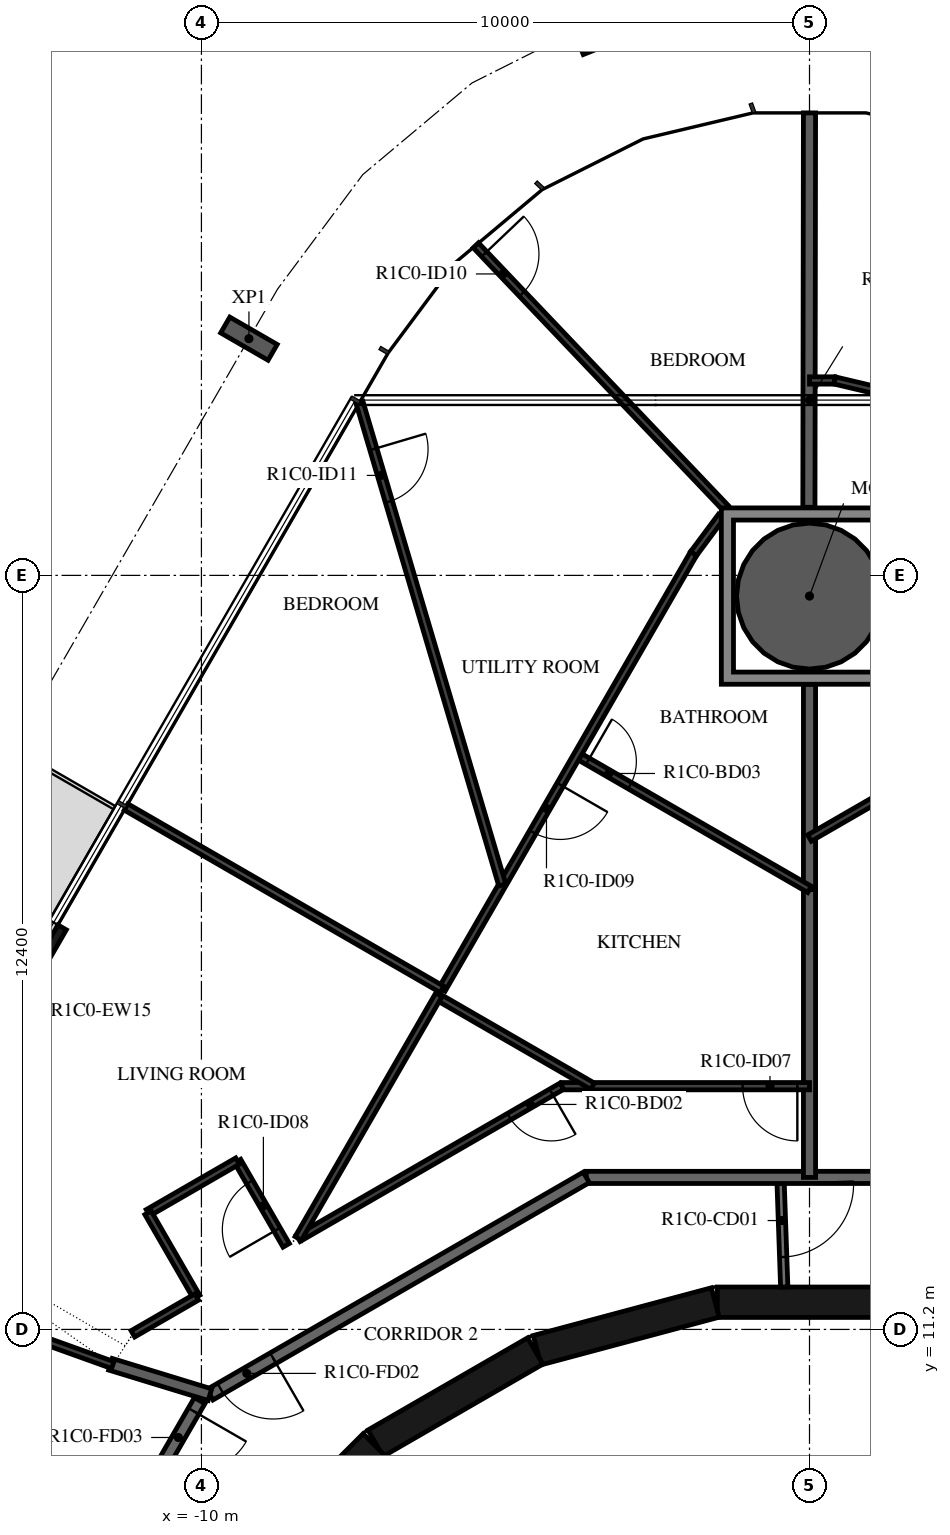
"""IFC4 building model, lengths in metres.
Left out: names, types, materials, properties, quantities, classifications, styles, units other than length and angle.
Written with IfcOpenShell. Run it as: python <this file> out.ifc"""

import sys

from ifc_helpers import new_model, si_unit, direction, frame, frame_2d, origin, origin_2d, place, context, subcontext, project, spatial, polyline, rectangle, hollow_circle, i_section, outline, extrude, element, fill, save


model = new_model("IFC4")
c1 = context("Model", 3, precision=1e-05, world=origin(), true_north=direction((0.0, 1.0)))
c2 = subcontext(c1, "Body", "Model", "MODEL_VIEW")
j1 = project(units=[si_unit("LENGTHUNIT", "METRE"), si_unit("PLANEANGLEUNIT", "RADIAN")], contexts=[c1])
p1 = place(None, origin())
s1 = spatial("IfcSite", under=j1, at=p1, CompositionType="ELEMENT")
p2 = place(p1, origin())
s2 = spatial("IfcBuilding", under=s1, at=p2, CompositionType="ELEMENT")
p3 = place(p2, frame((0.0, 0.0, 59.4)))
s3 = spatial("IfcBuildingStorey", under=s2, at=p3, CompositionType="ELEMENT", Elevation=59.4)
p4 = place(p3, frame((0.0, 23.26, -0.38), z_axis=(0.0, 0.0, 1.0), x_axis=(1.0, 0.0, 0.0)))
e1 = element("IfcColumn", 1, at=p4, inside=s3, PredefinedType="COLUMN", context=c2, shape_type="SweptSolid", body=[
    extrude(hollow_circle(Radius=1.2, WallThickness=0.06, at=origin_2d()), origin(), (0.0, 0.0, 1.0), 3.5),
])
for number, where, z_axis, x_axis in (
    (2, (-3.748, 32.639, -0.38), (0.0, 0.0, 1.0), (0.929, 0.371, 0.0)),
    (3, (-9.219, 27.493, -0.38), (0.0, 0.0, 1.0), (0.5, 0.866, 0.0)),
):
    element("IfcColumn", number, at=place(p3, frame(where, z_axis=z_axis, x_axis=x_axis)), inside=s3, PredefinedType="COLUMN", context=c2, shape_type="SweptSolid", body=[
        extrude(i_section(OverallWidth=0.3, OverallDepth=0.9, WebThickness=0.019, FlangeThickness=0.035, FilletRadius=0.03, at=origin_2d()), origin(), (0.0, 0.0, 1.0), 3.5),
    ])
p5 = place(p3, frame((-12.291, 17.812, 0.0), z_axis=(0.0, 0.0, 1.0), x_axis=(-0.499971222258, -0.866042017984, 0.0)))
e4 = element("IfcWall", 4, at=p5, inside=s3, PredefinedType="STANDARD", context=c2, shape_type="SweptSolid", body=[
    extrude(rectangle(XDim=3.2, YDim=0.16, at=frame_2d((1.6, 0.0))), origin(), (0.0, 0.0, 1.0), 3.12),
])
p6 = place(p5, frame((0.4, 0.0, 0.0)))
e5 = element("IfcOpeningElement", 5, at=p6, cuts=e4, PredefinedType="OPENING", context=c2, shape_type="SweptSolid", body=[
    extrude(rectangle(XDim=2.4, YDim=2.4, at=frame_2d((1.2, 1.2))), frame((0.0, 0.09, 0.0), z_axis=(0.0, -1.0, 0.0), x_axis=(1.0, 0.0, 0.0)), (0.0, 0.0, 1.0), 0.18),
])
for number, where, z_axis, x_axis in (
    (6, (1.516, 11.647, 0.0), (0.0, 0.0, 1.0), (-1.0, 0.0, 0.0)),
    (7, (-1.55, 11.643, 0.0), (0.0, 0.0, 1.0), (-0.966, -0.259, 0.0)),
    (8, (-4.51, 10.845, 0.0), (0.0, 0.0, 1.0), (-0.866, -0.5, 0.0)),
):
    element("IfcWall", number, at=place(p3, frame(where, z_axis=z_axis, x_axis=x_axis)), inside=s3, PredefinedType="SHEAR", context=c2, shape_type="SweptSolid", body=[
        extrude(rectangle(XDim=3.033, YDim=0.5, at=frame_2d((1.516, 0.0))), origin(), (0.0, 0.0, 1.0), 3.12),
    ])
p7 = place(p3, frame((-7.164, 9.308, 0.0), z_axis=(0.0, 0.0, 1.0), x_axis=(-0.707106781187, -0.707106781187, 0.0)))
e9 = element("IfcWall", 9, at=p7, inside=s3, PredefinedType="SHEAR", context=c2, shape_type="SweptSolid", body=[
    extrude(rectangle(XDim=3.032, YDim=0.5, at=frame_2d((1.516, 0.0))), origin(), (0.0, 0.0, 1.0), 3.12),
])
p8 = place(p7, frame((1.416, 0.0, 0.0)))
e10 = element("IfcOpeningElement", 10, at=p8, cuts=e9, PredefinedType="OPENING", context=c2, shape_type="SweptSolid", body=[
    extrude(rectangle(XDim=1.2, YDim=2.1, at=frame_2d((0.6, 1.05))), frame((0.0, 0.26, 0.0), z_axis=(0.0, -1.0, 0.0), x_axis=(1.0, 0.0, 0.0)), (0.0, 0.0, 1.0), 0.52),
])
p9 = place(p3, frame((-0.479, 13.7, 0.0), z_axis=(0.0, 0.0, 1.0), x_axis=(0.034919103017, -0.999390142159, 0.0)))
e11 = element("IfcWall", 11, at=p9, inside=s3, PredefinedType="PARTITIONING", context=c2, shape_type="SweptSolid", body=[
    extrude(rectangle(XDim=1.804, YDim=0.12, at=frame_2d((0.902, 0.0))), origin(), (0.0, 0.0, 1.0), 3.12),
])
p10 = place(p9, frame((0.11, 0.0, 0.0)))
e12 = element("IfcOpeningElement", 12, at=p10, cuts=e11, PredefinedType="OPENING", context=c2, shape_type="SweptSolid", body=[
    extrude(rectangle(XDim=1.2, YDim=2.1, at=frame_2d((0.6, 1.05))), frame((0.0, 0.07, 0.0), z_axis=(0.0, -1.0, 0.0), x_axis=(1.0, 0.0, 0.0)), (0.0, 0.0, 1.0), 0.14),
])
p11 = place(p3, frame((3.671, 13.7, 0.0), z_axis=(0.0, 0.0, 1.0), x_axis=(-1.0, 0.0, 0.0)))
e13 = element("IfcWall", 13, at=p11, inside=s3, PredefinedType="STANDARD", context=c2, shape_type="SweptSolid", body=[
    extrude(rectangle(XDim=7.342, YDim=0.2, at=frame_2d((3.671, 0.0))), origin(), (0.0, 0.0, 1.0), 3.12),
])
p12 = place(p3, frame((-3.671, 13.7, 0.0), z_axis=(0.0, 0.0, 1.0), x_axis=(-0.866031419417, -0.499989580474, 0.0)))
e14 = element("IfcWall", 14, at=p12, inside=s3, PredefinedType="STANDARD", context=c2, shape_type="SweptSolid", body=[
    extrude(rectangle(XDim=7.147, YDim=0.2, at=frame_2d((3.573, 0.0))), origin(), (0.0, 0.0, 1.0), 3.12),
])
p13 = place(p12, frame((5.947, 0.0, 0.0)))
e15 = element("IfcOpeningElement", 15, at=p13, cuts=e14, PredefinedType="OPENING", context=c2, shape_type="SweptSolid", body=[
    extrude(rectangle(XDim=1.0, YDim=2.1, at=frame_2d((0.5, 1.05))), frame((0.0, 0.11, 0.0), z_axis=(0.0, -1.0, 0.0), x_axis=(1.0, 0.0, 0.0)), (0.0, 0.0, 1.0), 0.22),
])
p14 = place(p3, frame((-10.029, 10.029, 0.0), z_axis=(0.0, 0.0, 1.0), x_axis=(-0.500001669485, -0.866024439905, 0.0)))
e16 = element("IfcWall", 16, at=p14, inside=s3, PredefinedType="STANDARD", context=c2, shape_type="SweptSolid", body=[
    extrude(rectangle(XDim=7.342, YDim=0.2, at=frame_2d((3.671, 0.0))), origin(), (0.0, 0.0, 1.0), 3.12),
])
p15 = place(p14, frame((0.2, 0.0, 0.0)))
e17 = element("IfcOpeningElement", 17, at=p15, cuts=e16, PredefinedType="OPENING", context=c2, shape_type="SweptSolid", body=[
    extrude(rectangle(XDim=1.0, YDim=2.1, at=frame_2d((0.5, 1.05))), frame((0.0, 0.11, 0.0), z_axis=(0.0, -1.0, 0.0), x_axis=(1.0, 0.0, 0.0)), (0.0, 0.0, 1.0), 0.22),
])
p16 = place(p3, frame((0.0, 18.437, 0.0), z_axis=(0.0, 0.0, 1.0), x_axis=(0.0, -1.0, 0.0)))
e18 = element("IfcWall", 18, at=p16, inside=s3, PredefinedType="STANDARD", context=c2, shape_type="SweptSolid", body=[
    extrude(rectangle(XDim=4.737, YDim=0.2, at=frame_2d((2.368, 0.0))), origin(), (0.0, 0.0, 1.0), 3.12),
])
p17 = place(p3, frame((0.0, 21.81, 0.0), z_axis=(0.0, 0.0, 1.0), x_axis=(0.0, -1.0, 0.0)))
e19 = element("IfcWall", 19, at=p17, inside=s3, PredefinedType="STANDARD", context=c2, shape_type="SweptSolid", body=[
    extrude(rectangle(XDim=3.373, YDim=0.2, at=frame_2d((1.687, 0.0))), origin(), (0.0, 0.0, 1.0), 3.12),
])
p18 = place(p3, frame((0.0, 31.206, 0.0), z_axis=(0.0, 0.0, 1.0), x_axis=(-0.001543266126, -0.999998809164, 0.0)))
e20 = element("IfcWall", 20, at=p18, inside=s3, PredefinedType="STANDARD", context=c2, shape_type="SweptSolid", body=[
    extrude(rectangle(XDim=6.486, YDim=0.2, at=frame_2d((3.243, 0.0))), origin(), (0.0, 0.0, 1.0), 3.12),
])
p19 = place(p3, frame((-11.496, 10.627, 0.0), z_axis=(0.0, 0.0, 1.0), x_axis=(0.956240708563, -0.292581112321, 0.0)))
e21 = element("IfcWall", 21, at=p19, inside=s3, PredefinedType="STANDARD", context=c2, shape_type="SweptSolid", body=[
    extrude(rectangle(XDim=1.711, YDim=0.2, at=frame_2d((0.855, 0.0))), origin(), (0.0, 0.0, 1.0), 3.12),
])
p20 = place(p3, frame((4.841, 22.075, 0.0), z_axis=(0.0, 0.0, 1.0), x_axis=(-0.866019751484, -0.500009789943, 0.0)))
e22 = element("IfcWall", 22, at=p20, inside=s3, PredefinedType="PARTITIONING", context=c2, shape_type="SweptSolid", body=[
    extrude(rectangle(XDim=5.59, YDim=0.12, at=frame_2d((2.795, 0.0))), origin(), (0.0, 0.0, 1.0), 3.12),
])
p21 = place(p20, frame((0.2, 0.0, 0.0)))
e23 = element("IfcOpeningElement", 23, at=p21, cuts=e22, PredefinedType="OPENING", context=c2, shape_type="SweptSolid", body=[
    extrude(rectangle(XDim=0.9, YDim=2.1, at=frame_2d((0.45, 1.05))), frame((0.0, 0.07, 0.0), z_axis=(0.0, -1.0, 0.0), x_axis=(1.0, 0.0, 0.0)), (0.0, 0.0, 1.0), 0.14),
])
p22 = place(p3, frame((0.0, 26.806, 0.0), z_axis=(0.0, 0.0, 1.0), x_axis=(1.0, 0.0, 0.0)))
e24 = element("IfcWall", 24, at=p22, inside=s3, PredefinedType="PARTITIONING", context=c2, shape_type="SweptSolid", body=[
    extrude(rectangle(XDim=0.415, YDim=0.12, at=frame_2d((0.207, 0.0))), origin(), (0.0, 0.0, 1.0), 3.12),
])
p23 = place(p3, frame((0.415, 26.806, 0.0), z_axis=(0.0, 0.0, 1.0), x_axis=(0.973048993259, -0.230598475097, 0.0)))
e25 = element("IfcWall", 25, at=p23, inside=s3, PredefinedType="PARTITIONING", context=c2, shape_type="SweptSolid", body=[
    extrude(rectangle(XDim=0.829, YDim=0.12, at=frame_2d((0.415, 0.0))), origin(), (0.0, 0.0, 1.0), 3.12),
])
p24 = place(p3, frame((0.0, 15.2, 0.0), z_axis=(0.0, 0.0, 1.0), x_axis=(-1.0, 0.0, 0.0)))
e26 = element("IfcWall", 26, at=p24, inside=s3, PredefinedType="PARTITIONING", context=c2, shape_type="SweptSolid", body=[
    extrude(rectangle(XDim=4.073, YDim=0.12, at=frame_2d((2.036, 0.0))), origin(), (0.0, 0.0, 1.0), 3.12),
])
p25 = place(p24, frame((0.2, 0.0, 0.0)))
e27 = element("IfcOpeningElement", 27, at=p25, cuts=e26, PredefinedType="OPENING", context=c2, shape_type="SweptSolid", body=[
    extrude(rectangle(XDim=0.9, YDim=2.1, at=frame_2d((0.45, 1.05))), frame((0.0, 0.07, 0.0), z_axis=(0.0, -1.0, 0.0), x_axis=(1.0, 0.0, 0.0)), (0.0, 0.0, 1.0), 0.14),
])
p26 = place(p3, frame((-4.073, 15.2, 0.0), z_axis=(0.0, 0.0, 1.0), x_axis=(-0.866034514313, -0.499984219769, 0.0)))
e28 = element("IfcWall", 28, at=p26, inside=s3, PredefinedType="PARTITIONING", context=c2, shape_type="SweptSolid", body=[
    extrude(rectangle(XDim=5.006, YDim=0.12, at=frame_2d((2.503, 0.0))), origin(), (0.0, 0.0, 1.0), 3.12),
])
p27 = place(p26, frame((0.2, 0.0, 0.0)))
e29 = element("IfcOpeningElement", 29, at=p27, cuts=e28, PredefinedType="OPENING", context=c2, shape_type="SweptSolid", body=[
    extrude(rectangle(XDim=0.8, YDim=2.1, at=frame_2d((0.4, 1.05))), frame((0.0, 0.07, 0.0), z_axis=(0.0, -1.0, 0.0), x_axis=(1.0, 0.0, 0.0)), (0.0, 0.0, 1.0), 0.14),
])
p28 = place(p3, frame((-8.606, 12.583, 0.0), z_axis=(0.0, 0.0, 1.0), x_axis=(-0.499995408039, 0.866028054938, 0.0)))
e30 = element("IfcWall", 30, at=p28, inside=s3, PredefinedType="PARTITIONING", context=c2, shape_type="SweptSolid", body=[
    extrude(rectangle(XDim=1.6, YDim=0.12, at=frame_2d((0.8, 0.0))), origin(), (0.0, 0.0, 1.0), 3.12),
])
p29 = place(p28, frame((0.3, 0.0, 0.0)))
e31 = element("IfcOpeningElement", 31, at=p29, cuts=e30, PredefinedType="OPENING", context=c2, shape_type="SweptSolid", body=[
    extrude(rectangle(XDim=0.9, YDim=2.1, at=frame_2d((0.45, 1.05))), frame((0.0, 0.07, 0.0), z_axis=(0.0, -1.0, 0.0), x_axis=(1.0, 0.0, 0.0)), (0.0, 0.0, 1.0), 0.14),
])
p30 = place(p3, frame((-9.406, 13.969, 0.0), z_axis=(0.0, 0.0, 1.0), x_axis=(-0.865989465428, -0.500062241894, 0.0)))
e32 = element("IfcWall", 32, at=p30, inside=s3, PredefinedType="PARTITIONING", context=c2, shape_type="SweptSolid", body=[
    extrude(rectangle(XDim=1.7, YDim=0.12, at=frame_2d((0.85, 0.0))), origin(), (0.0, 0.0, 1.0), 3.12),
])
p31 = place(p3, frame((-10.878, 13.118, 0.0), z_axis=(0.0, 0.0, 1.0), x_axis=(0.500061482766, -0.865989903783, 0.0)))
e33 = element("IfcWall", 33, at=p31, inside=s3, PredefinedType="PARTITIONING", context=c2, shape_type="SweptSolid", body=[
    extrude(rectangle(XDim=1.6, YDim=0.12, at=frame_2d((0.8, 0.0))), origin(), (0.0, 0.0, 1.0), 3.12),
])
p32 = place(p3, frame((-10.078, 11.733, 0.0), z_axis=(0.0, 0.0, 1.0), x_axis=(-0.866014416983, -0.500019029215, 0.0)))
e34 = element("IfcWall", 34, at=p32, inside=s3, PredefinedType="PARTITIONING", context=c2, shape_type="SweptSolid", body=[
    extrude(rectangle(XDim=1.211, YDim=0.12, at=frame_2d((0.606, 0.0))), origin(), (0.0, 0.0, 1.0), 3.12),
])
p33 = place(p3, frame((-5.487, 29.028, 0.0), z_axis=(0.0, 0.0, 1.0), x_axis=(0.689189638576, -0.724581011398, 0.0)))
e35 = element("IfcWall", 35, at=p33, inside=s3, PredefinedType="PARTITIONING", context=c2, shape_type="SweptSolid", body=[
    extrude(rectangle(XDim=5.96, YDim=0.12, at=frame_2d((2.98, 0.0))), origin(), (0.0, 0.0, 1.0), 3.12),
])
p34 = place(p33, frame((0.2, 0.0, 0.0)))
e36 = element("IfcOpeningElement", 36, at=p34, cuts=e35, PredefinedType="OPENING", context=c2, shape_type="SweptSolid", body=[
    extrude(rectangle(XDim=0.9, YDim=2.1, at=frame_2d((0.45, 1.05))), frame((0.0, 0.07, 0.0), z_axis=(0.0, -1.0, 0.0), x_axis=(1.0, 0.0, 0.0)), (0.0, 0.0, 1.0), 0.14),
])
p35 = place(p3, frame((-3.821, 20.643, 0.0), z_axis=(0.0, 0.0, 1.0), x_axis=(0.866024310165, -0.5000018942, 0.0)))
e37 = element("IfcWall", 37, at=p35, inside=s3, PredefinedType="PARTITIONING", context=c2, shape_type="SweptSolid", body=[
    extrude(rectangle(XDim=4.412, YDim=0.12, at=frame_2d((2.206, 0.0))), origin(), (0.0, 0.0, 1.0), 3.12),
])
p36 = place(p35, frame((0.2, 0.0, 0.0)))
e38 = element("IfcOpeningElement", 38, at=p36, cuts=e37, PredefinedType="OPENING", context=c2, shape_type="SweptSolid", body=[
    extrude(rectangle(XDim=0.8, YDim=2.1, at=frame_2d((0.4, 1.05))), frame((0.0, 0.07, 0.0), z_axis=(0.0, -1.0, 0.0), x_axis=(1.0, 0.0, 0.0)), (0.0, 0.0, 1.0), 0.14),
])
p37 = place(p3, frame((-1.45, 24.571, 0.0), z_axis=(0.0, 0.0, 1.0), x_axis=(-0.597187509737, -0.802101663266, 0.0)))
e39 = element("IfcWall", 39, at=p37, inside=s3, PredefinedType="PARTITIONING", context=c2, shape_type="SweptSolid", body=[
    extrude(rectangle(XDim=0.765, YDim=0.12, at=frame_2d((0.382, 0.0))), origin(), (0.0, 0.0, 1.0), 3.12),
])
p38 = place(p3, frame((-1.907, 23.957, 0.0), z_axis=(0.0, 0.0, 1.0), x_axis=(-0.499994901178, -0.866028347571, 0.0)))
e40 = element("IfcWall", 40, at=p38, inside=s3, PredefinedType="PARTITIONING", context=c2, shape_type="SweptSolid", body=[
    extrude(rectangle(XDim=8.274, YDim=0.12, at=frame_2d((4.137, 0.0))), origin(), (0.0, 0.0, 1.0), 3.12),
])
p39 = place(p38, frame((4.387, 0.0, 0.0)))
e41 = element("IfcOpeningElement", 41, at=p39, cuts=e40, PredefinedType="OPENING", context=c2, shape_type="SweptSolid", body=[
    extrude(rectangle(XDim=0.9, YDim=2.1, at=frame_2d((0.45, 1.05))), frame((0.0, 0.07, 0.0), z_axis=(0.0, -1.0, 0.0), x_axis=(1.0, 0.0, 0.0)), (0.0, 0.0, 1.0), 0.14),
])
p40 = place(p3, frame((-6.114, 16.67, 0.0), z_axis=(0.0, 0.0, 1.0), x_axis=(0.866011328839, -0.500024377727, 0.0)))
e42 = element("IfcWall", 42, at=p40, inside=s3, PredefinedType="PARTITIONING", context=c2, shape_type="SweptSolid", body=[
    extrude(rectangle(XDim=2.94, YDim=0.12, at=frame_2d((1.47, 0.0))), origin(), (0.0, 0.0, 1.0), 3.12),
])
p41 = place(p3, frame((-7.4, 26.443, 0.0), z_axis=(0.0, 0.0, 1.0), x_axis=(0.283777867447, -0.95889004685, 0.0)))
e43 = element("IfcWall", 43, at=p41, inside=s3, PredefinedType="PARTITIONING", context=c2, shape_type="SweptSolid", body=[
    extrude(rectangle(XDim=8.274, YDim=0.12, at=frame_2d((4.137, 0.0))), origin(), (0.0, 0.0, 1.0), 3.12),
])
p42 = place(p41, frame((0.8, 0.0, 0.0)))
e44 = element("IfcOpeningElement", 44, at=p42, cuts=e43, PredefinedType="OPENING", context=c2, shape_type="SweptSolid", body=[
    extrude(rectangle(XDim=0.9, YDim=2.1, at=frame_2d((0.45, 1.05))), frame((0.0, 0.07, 0.0), z_axis=(0.0, -1.0, 0.0), x_axis=(1.0, 0.0, 0.0)), (0.0, 0.0, 1.0), 0.14),
])
p43 = place(p3, frame((-11.24, 19.792, 0.0), z_axis=(0.0, 0.0, 1.0), x_axis=(0.866031096941, -0.499990139034, 0.0)))
e45 = element("IfcWall", 45, at=p43, inside=s3, PredefinedType="PARTITIONING", context=c2, shape_type="SweptSolid", body=[
    extrude(rectangle(XDim=6.0, YDim=0.12, at=frame_2d((3.0, 0.0))), origin(), (0.0, 0.0, 1.0), 2.73),
])
p44 = place(p3, frame((-6.094, 16.705, 0.0), z_axis=(0.0, 0.0, 1.0), x_axis=(-0.500014747178, -0.86601688933, 0.0)))
e46 = element("IfcWall", 46, at=p44, inside=s3, PredefinedType="PARTITIONING", context=c2, shape_type="SweptSolid", body=[
    extrude(rectangle(XDim=4.627, YDim=0.12, at=frame_2d((2.313, 0.0))), origin(), (0.0, 0.0, 1.0), 3.12),
])
p45 = place(p3, frame((-11.458, 10.614, 0.0), z_axis=(0.0, 0.0, 1.0), x_axis=(-0.941092440198, 0.338149403375, 0.0)))
e47 = element("IfcWall", 47, at=p45, inside=s3, PredefinedType="PARTITIONING", context=c2, shape_type="SweptSolid", body=[
    extrude(rectangle(XDim=2.123, YDim=0.12, at=frame_2d((1.062, 0.0))), origin(), (0.0, 0.0, 1.0), 3.12),
])
p46 = place(p3, origin())
e48 = element("IfcWall", 48, at=p46, inside=s3, PredefinedType="STANDARD", context=c2, shape_type="SweptSolid", body=[
    extrude(outline(polyline([(1.45, 24.71), (1.45, 21.81), (-1.45, 21.81), (-1.45, 24.71), (1.45, 24.71)]), holes=[polyline([(-1.25, 22.01), (1.25, 22.01), (1.25, 24.51), (-1.25, 24.51), (-1.25, 22.01)])]), origin(), (0.0, 0.0, 1.0), 3.12),
])
p47 = place(p13, origin())
e49 = element("IfcDoor", 49, at=p47, inside=s3, OperationType="SINGLE_SWING_LEFT", PredefinedType="DOOR", context=c2, shape_type="SweptSolid", body=[
    extrude(rectangle(XDim=1.0, YDim=2.1, at=frame_2d((0.5, 1.05))), frame((0.0, 0.025, 0.0), z_axis=(0.0, -1.0, 0.0), x_axis=(1.0, 0.0, 0.0)), (0.0, 0.0, 1.0), 0.05),
])
fill(e15, e49)
p48 = place(p25, origin())
e50 = element("IfcDoor", 50, at=p48, inside=s3, OperationType="SINGLE_SWING_RIGHT", PredefinedType="DOOR", context=c2, shape_type="SweptSolid", body=[
    extrude(rectangle(XDim=0.9, YDim=2.1, at=frame_2d((0.45, 1.05))), frame((0.0, 0.025, 0.0), z_axis=(0.0, -1.0, 0.0), x_axis=(1.0, 0.0, 0.0)), (0.0, 0.0, 1.0), 0.05),
])
fill(e27, e50)
p49 = place(p27, origin())
e51 = element("IfcDoor", 51, at=p49, inside=s3, OperationType="SINGLE_SWING_LEFT", PredefinedType="DOOR", context=c2, shape_type="SweptSolid", body=[
    extrude(rectangle(XDim=0.8, YDim=2.1, at=frame_2d((0.4, 1.05))), frame((0.0, 0.025, 0.0), z_axis=(0.0, -1.0, 0.0), x_axis=(1.0, 0.0, 0.0)), (0.0, 0.0, 1.0), 0.05),
])
fill(e29, e51)
p50 = place(p29, origin())
e52 = element("IfcDoor", 52, at=p50, inside=s3, OperationType="SINGLE_SWING_RIGHT", PredefinedType="DOOR", context=c2, shape_type="SweptSolid", body=[
    extrude(rectangle(XDim=0.9, YDim=2.1, at=frame_2d((0.45, 1.05))), frame((0.0, 0.025, 0.0), z_axis=(0.0, -1.0, 0.0), x_axis=(1.0, 0.0, 0.0)), (0.0, 0.0, 1.0), 0.05),
])
fill(e31, e52)
p51 = place(p36, origin())
e53 = element("IfcDoor", 53, at=p51, inside=s3, OperationType="SINGLE_SWING_LEFT", PredefinedType="DOOR", context=c2, shape_type="SweptSolid", body=[
    extrude(rectangle(XDim=0.8, YDim=2.1, at=frame_2d((0.4, 1.05))), frame((0.0, 0.025, 0.0), z_axis=(0.0, -1.0, 0.0), x_axis=(1.0, 0.0, 0.0)), (0.0, 0.0, 1.0), 0.05),
])
fill(e38, e53)
p52 = place(p39, origin())
e54 = element("IfcDoor", 54, at=p52, inside=s3, OperationType="SINGLE_SWING_LEFT", PredefinedType="DOOR", context=c2, shape_type="SweptSolid", body=[
    extrude(rectangle(XDim=0.9, YDim=2.1, at=frame_2d((0.45, 1.05))), frame((0.0, 0.025, 0.0), z_axis=(0.0, -1.0, 0.0), x_axis=(1.0, 0.0, 0.0)), (0.0, 0.0, 1.0), 0.05),
])
fill(e41, e54)
p53 = place(p34, origin())
e55 = element("IfcDoor", 55, at=p53, inside=s3, OperationType="SINGLE_SWING_LEFT", PredefinedType="DOOR", context=c2, shape_type="SweptSolid", body=[
    extrude(rectangle(XDim=0.9, YDim=2.1, at=frame_2d((0.45, 1.05))), frame((0.0, 0.025, 0.0), z_axis=(0.0, -1.0, 0.0), x_axis=(1.0, 0.0, 0.0)), (0.0, 0.0, 1.0), 0.05),
])
fill(e36, e55)
p54 = place(p42, origin())
e56 = element("IfcDoor", 56, at=p54, inside=s3, OperationType="SINGLE_SWING_RIGHT", PredefinedType="DOOR", context=c2, shape_type="SweptSolid", body=[
    extrude(rectangle(XDim=0.9, YDim=2.1, at=frame_2d((0.45, 1.05))), frame((0.0, 0.025, 0.0), z_axis=(0.0, -1.0, 0.0), x_axis=(1.0, 0.0, 0.0)), (0.0, 0.0, 1.0), 0.05),
])
fill(e44, e56)
p55 = place(p15, origin())
e57 = element("IfcDoor", 57, at=p55, inside=s3, OperationType="SINGLE_SWING_LEFT", PredefinedType="DOOR", context=c2, shape_type="SweptSolid", body=[
    extrude(rectangle(XDim=1.0, YDim=2.1, at=frame_2d((0.5, 1.05))), frame((0.0, 0.025, 0.0), z_axis=(0.0, -1.0, 0.0), x_axis=(1.0, 0.0, 0.0)), (0.0, 0.0, 1.0), 0.05),
])
fill(e17, e57)
p56 = place(p10, origin())
e58 = element("IfcDoor", 58, at=p56, inside=s3, OperationType="DOUBLE_DOOR_SINGLE_SWING", PredefinedType="DOOR", context=c2, shape_type="SweptSolid", body=[
    extrude(rectangle(XDim=1.2, YDim=2.1, at=frame_2d((0.6, 1.05))), frame((0.0, 0.025, 0.0), z_axis=(0.0, -1.0, 0.0), x_axis=(1.0, 0.0, 0.0)), (0.0, 0.0, 1.0), 0.05),
])
fill(e12, e58)
save(model, sys.argv[1])
